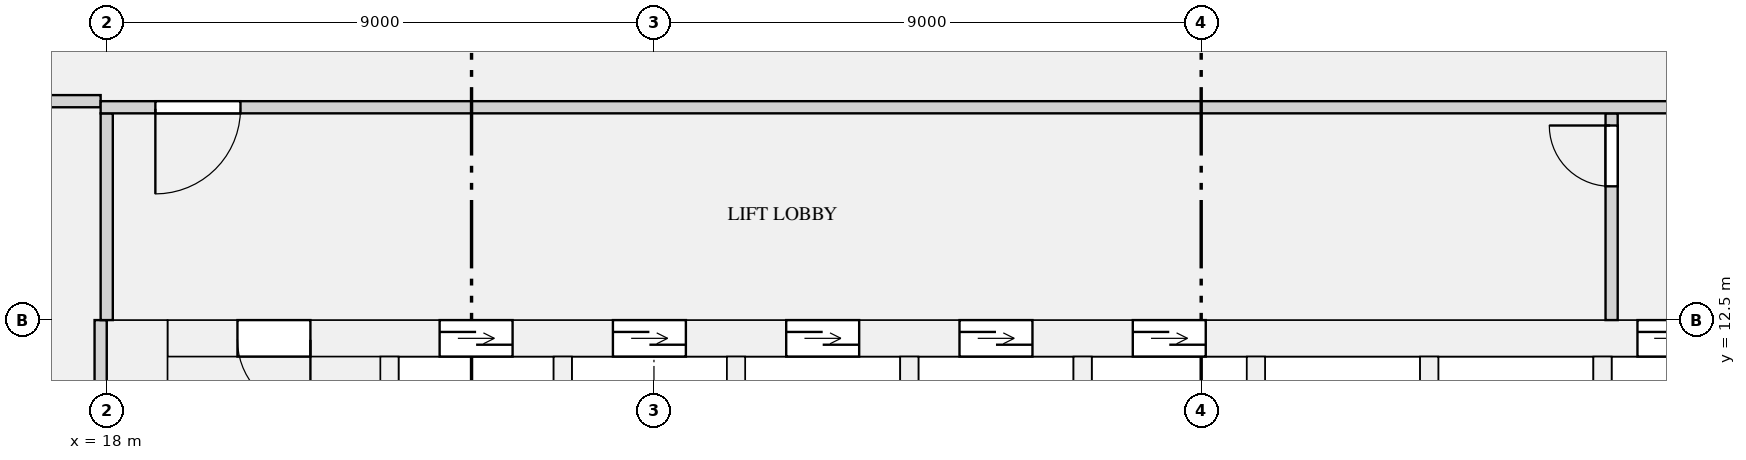
"""IFC4 building model, lengths in metres.
Left out: names, types, materials, properties, quantities, classifications, styles, units other than length and angle.
Written with IfcOpenShell. Run it as: python <this file> out.ifc"""

import sys

from ifc_helpers import new_model, si_unit, direction, frame, frame_2d, origin, place, context, subcontext, project, spatial, rectangle, extrude, element, fill, save


model = new_model("IFC4")
c1 = context("Model", 3, precision=1e-05, world=origin(), true_north=direction((0.0, 1.0)))
c2 = subcontext(c1, "Body", "Model", "MODEL_VIEW")
j1 = project(units=[si_unit("LENGTHUNIT", "METRE"), si_unit("PLANEANGLEUNIT", "RADIAN")], contexts=[c1])
p1 = place(None, origin())
s1 = spatial("IfcSite", under=j1, at=p1, CompositionType="ELEMENT")
p2 = place(p1, origin())
s2 = spatial("IfcBuilding", under=s1, at=p2, CompositionType="ELEMENT")
p3 = place(p2, frame((0.0, 0.0, 15.5)))
s3 = spatial("IfcBuildingStorey", under=s2, at=p3, CompositionType="ELEMENT", Elevation=15.5)
p4 = place(p3, frame((18.5, 0.0, 0.0), z_axis=(0.0, 0.0, 1.0), x_axis=(0.0, 1.0, 0.0)))
e1 = element("IfcWall", 1, at=p4, inside=s3, PredefinedType="SHEAR", context=c2, shape_type="SweptSolid", body=[
    extrude(rectangle(XDim=12.5, YDim=1.0, at=frame_2d((6.25, 0.0))), origin(), (0.0, 0.0, 1.0), 4.0),
])
p5 = place(p3, frame((19.0, 12.2, 0.0), z_axis=(0.0, 0.0, 1.0), x_axis=(1.0, 0.0, 0.0)))
e2 = element("IfcWall", 2, at=p5, inside=s3, PredefinedType="SHEAR", context=c2, shape_type="SweptSolid", body=[
    extrude(rectangle(XDim=34.0, YDim=0.6, at=frame_2d((17.0, 0.0))), origin(), (0.0, 0.0, 1.0), 4.0),
])
p6 = place(p5, frame((4.475, 0.0, 0.0)))
e3 = element("IfcOpeningElement", 3, at=p6, cuts=e2, PredefinedType="OPENING", context=c2, shape_type="SweptSolid", body=[
    extrude(rectangle(XDim=1.2, YDim=2.1, at=frame_2d((0.6, 1.05))), frame((0.0, 0.31, 0.0), z_axis=(0.0, -1.0, 0.0), x_axis=(1.0, 0.0, 0.0)), (0.0, 0.0, 1.0), 0.62),
])
p7 = place(p5, frame((7.325, 0.0, 0.0)))
e4 = element("IfcOpeningElement", 4, at=p7, cuts=e2, PredefinedType="OPENING", context=c2, shape_type="SweptSolid", body=[
    extrude(rectangle(XDim=1.2, YDim=2.1, at=frame_2d((0.6, 1.05))), frame((0.0, 0.31, 0.0), z_axis=(0.0, -1.0, 0.0), x_axis=(1.0, 0.0, 0.0)), (0.0, 0.0, 1.0), 0.62),
])
p8 = place(p5, frame((10.175, 0.0, 0.0)))
e5 = element("IfcOpeningElement", 5, at=p8, cuts=e2, PredefinedType="OPENING", context=c2, shape_type="SweptSolid", body=[
    extrude(rectangle(XDim=1.2, YDim=2.1, at=frame_2d((0.6, 1.05))), frame((0.0, 0.31, 0.0), z_axis=(0.0, -1.0, 0.0), x_axis=(1.0, 0.0, 0.0)), (0.0, 0.0, 1.0), 0.62),
])
p9 = place(p5, frame((13.025, 0.0, 0.0)))
e6 = element("IfcOpeningElement", 6, at=p9, cuts=e2, PredefinedType="OPENING", context=c2, shape_type="SweptSolid", body=[
    extrude(rectangle(XDim=1.2, YDim=2.1, at=frame_2d((0.6, 1.05))), frame((0.0, 0.31, 0.0), z_axis=(0.0, -1.0, 0.0), x_axis=(1.0, 0.0, 0.0)), (0.0, 0.0, 1.0), 0.62),
])
p10 = place(p5, frame((15.875, 0.0, 0.0)))
e7 = element("IfcOpeningElement", 7, at=p10, cuts=e2, PredefinedType="OPENING", context=c2, shape_type="SweptSolid", body=[
    extrude(rectangle(XDim=1.2, YDim=2.1, at=frame_2d((0.6, 1.05))), frame((0.0, 0.31, 0.0), z_axis=(0.0, -1.0, 0.0), x_axis=(1.0, 0.0, 0.0)), (0.0, 0.0, 1.0), 0.62),
])
p11 = place(p5, frame((24.175, 0.0, 0.0)))
e8 = element("IfcOpeningElement", 8, at=p11, cuts=e2, PredefinedType="OPENING", context=c2, shape_type="SweptSolid", body=[
    extrude(rectangle(XDim=1.1, YDim=2.1, at=frame_2d((0.55, 1.05))), frame((0.0, 0.31, 0.0), z_axis=(0.0, -1.0, 0.0), x_axis=(1.0, 0.0, 0.0)), (0.0, 0.0, 1.0), 0.62),
])
p12 = place(p5, frame((26.425, 0.0, 0.0)))
e9 = element("IfcOpeningElement", 9, at=p12, cuts=e2, PredefinedType="OPENING", context=c2, shape_type="SweptSolid", body=[
    extrude(rectangle(XDim=1.1, YDim=2.1, at=frame_2d((0.55, 1.05))), frame((0.0, 0.31, 0.0), z_axis=(0.0, -1.0, 0.0), x_axis=(1.0, 0.0, 0.0)), (0.0, 0.0, 1.0), 0.62),
])
p13 = place(p5, frame((28.675, 0.0, 0.0)))
e10 = element("IfcOpeningElement", 10, at=p13, cuts=e2, PredefinedType="OPENING", context=c2, shape_type="SweptSolid", body=[
    extrude(rectangle(XDim=1.1, YDim=2.1, at=frame_2d((0.55, 1.05))), frame((0.0, 0.31, 0.0), z_axis=(0.0, -1.0, 0.0), x_axis=(1.0, 0.0, 0.0)), (0.0, 0.0, 1.0), 0.62),
])
p14 = place(p5, frame((1.15, 0.0, 0.0)))
e11 = element("IfcOpeningElement", 11, at=p14, cuts=e2, PredefinedType="OPENING", context=c2, shape_type="SweptSolid", body=[
    extrude(rectangle(XDim=1.2, YDim=2.1, at=frame_2d((0.6, 1.05))), frame((0.0, 0.31, 0.0), z_axis=(0.0, -1.0, 0.0), x_axis=(1.0, 0.0, 0.0)), (0.0, 0.0, 1.0), 0.62),
])
p15 = place(p5, frame((31.65, 0.0, 0.0)))
e12 = element("IfcOpeningElement", 12, at=p15, cuts=e2, PredefinedType="OPENING", context=c2, shape_type="SweptSolid", body=[
    extrude(rectangle(XDim=1.2, YDim=2.1, at=frame_2d((0.6, 1.05))), frame((0.0, 0.31, 0.0), z_axis=(0.0, -1.0, 0.0), x_axis=(1.0, 0.0, 0.0)), (0.0, 0.0, 1.0), 0.62),
])
for number, where, z_axis, x_axis in (
    (13, (22.65, 9.35, 0.0), (0.0, 0.0, 1.0), (0.0, 1.0, 0.0)),
    (14, (25.5, 9.35, 0.0), (0.0, 0.0, 1.0), (0.0, 1.0, 0.0)),
    (15, (28.35, 9.35, 0.0), (0.0, 0.0, 1.0), (0.0, 1.0, 0.0)),
    (16, (31.2, 9.35, 0.0), (0.0, 0.0, 1.0), (0.0, 1.0, 0.0)),
    (17, (34.05, 9.35, 0.0), (0.0, 0.0, 1.0), (0.0, 1.0, 0.0)),
    (18, (36.9, 9.35, 0.0), (0.0, 0.0, 1.0), (0.0, 1.0, 0.0)),
    (19, (39.75, 9.35, 0.0), (0.0, 0.0, 1.0), (0.0, 1.0, 0.0)),
):
    element("IfcWall", number, at=place(p3, frame(where, z_axis=z_axis, x_axis=x_axis)), inside=s3, PredefinedType="SHEAR", context=c2, shape_type="SweptSolid", body=[
        extrude(rectangle(XDim=2.55, YDim=0.3, at=frame_2d((1.275, 0.0))), origin(), (0.0, 0.0, 1.0), 4.0),
    ])
p16 = place(p3, frame((42.6, 8.25, 0.0), z_axis=(0.0, 0.0, 1.0), x_axis=(0.0, 1.0, 0.0)))
e20 = element("IfcWall", 20, at=p16, inside=s3, PredefinedType="SHEAR", context=c2, shape_type="SweptSolid", body=[
    extrude(rectangle(XDim=3.65, YDim=0.3, at=frame_2d((1.825, 0.0))), origin(), (0.0, 0.0, 1.0), 4.0),
])
p17 = place(p3, frame((18.0, 12.5, 0.0), z_axis=(0.0, 0.0, 1.0), x_axis=(0.0, 1.0, 0.0)))
e21 = element("IfcWall", 21, at=p17, inside=s3, PredefinedType="PARTITIONING", context=c2, shape_type="SweptSolid", body=[
    extrude(rectangle(XDim=3.4, YDim=0.2, at=frame_2d((1.7, 0.0))), origin(), (0.0, 0.0, 1.0), 3.68),
])
p18 = place(p3, frame((42.75, 12.5, 0.0), z_axis=(0.0, 0.0, 1.0), x_axis=(0.0, 1.0, 0.0)))
e22 = element("IfcWall", 22, at=p18, inside=s3, PredefinedType="PARTITIONING", context=c2, shape_type="SweptSolid", body=[
    extrude(rectangle(XDim=3.4, YDim=0.2, at=frame_2d((1.7, 0.0))), origin(), (0.0, 0.0, 1.0), 3.68),
])
p19 = place(p18, frame((2.2, 0.0, 0.0)))
e23 = element("IfcOpeningElement", 23, at=p19, cuts=e22, PredefinedType="OPENING", context=c2, shape_type="SweptSolid", body=[
    extrude(rectangle(XDim=1.0, YDim=2.1, at=frame_2d((0.5, 1.05))), frame((0.0, 0.11, 0.0), z_axis=(0.0, -1.0, 0.0), x_axis=(1.0, 0.0, 0.0)), (0.0, 0.0, 1.0), 0.22),
])
p20 = place(p3, frame((17.9, 16.0, 0.0), z_axis=(0.0, 0.0, 1.0), x_axis=(1.0, 0.0, 0.0)))
e24 = element("IfcWall", 24, at=p20, inside=s3, PredefinedType="PARTITIONING", context=c2, shape_type="SweptSolid", body=[
    extrude(rectangle(XDim=36.2, YDim=0.2, at=frame_2d((18.1, 0.0))), origin(), (0.0, 0.0, 1.0), 3.68),
])
p21 = place(p20, frame((0.9, 0.0, 0.0)))
e25 = element("IfcOpeningElement", 25, at=p21, cuts=e24, PredefinedType="OPENING", context=c2, shape_type="SweptSolid", body=[
    extrude(rectangle(XDim=1.4, YDim=2.1, at=frame_2d((0.7, 1.05))), frame((0.0, 0.11, 0.0), z_axis=(0.0, -1.0, 0.0), x_axis=(1.0, 0.0, 0.0)), (0.0, 0.0, 1.0), 0.22),
])
p22 = place(p20, frame((33.9, 0.0, 0.0)))
e26 = element("IfcOpeningElement", 26, at=p22, cuts=e24, PredefinedType="OPENING", context=c2, shape_type="SweptSolid", body=[
    extrude(rectangle(XDim=1.4, YDim=2.1, at=frame_2d((0.7, 1.05))), frame((0.0, 0.11, 0.0), z_axis=(0.0, -1.0, 0.0), x_axis=(1.0, 0.0, 0.0)), (0.0, 0.0, 1.0), 0.22),
])
p23 = place(p3, frame((4.3, 16.1, 0.0), z_axis=(0.0, 0.0, 1.0), x_axis=(1.0, 0.0, 0.0)))
e27 = element("IfcWall", 27, at=p23, inside=s3, PredefinedType="PARTITIONING", context=c2, shape_type="SweptSolid", body=[
    extrude(rectangle(XDim=13.6, YDim=0.2, at=frame_2d((6.8, 0.0))), origin(), (0.0, 0.0, 1.0), 3.68),
])
p24 = place(p23, frame((0.45, 0.0, 0.0)))
e28 = element("IfcOpeningElement", 28, at=p24, cuts=e27, PredefinedType="OPENING", context=c2, shape_type="SweptSolid", body=[
    extrude(rectangle(XDim=1.8, YDim=2.1, at=frame_2d((0.9, 1.05))), frame((0.0, 0.11, 0.0), z_axis=(0.0, -1.0, 0.0), x_axis=(1.0, 0.0, 0.0)), (0.0, 0.0, 1.0), 0.22),
])
p25 = place(p23, frame((5.3, 0.0, 0.0)))
e29 = element("IfcOpeningElement", 29, at=p25, cuts=e27, PredefinedType="OPENING", context=c2, shape_type="SweptSolid", body=[
    extrude(rectangle(XDim=1.8, YDim=2.1, at=frame_2d((0.9, 1.05))), frame((0.0, 0.11, 0.0), z_axis=(0.0, -1.0, 0.0), x_axis=(1.0, 0.0, 0.0)), (0.0, 0.0, 1.0), 0.22),
])
p26 = place(p23, frame((10.25, 0.0, 0.0)))
e30 = element("IfcOpeningElement", 30, at=p26, cuts=e27, PredefinedType="OPENING", context=c2, shape_type="SweptSolid", body=[
    extrude(rectangle(XDim=1.8, YDim=2.1, at=frame_2d((0.9, 1.05))), frame((0.0, 0.11, 0.0), z_axis=(0.0, -1.0, 0.0), x_axis=(1.0, 0.0, 0.0)), (0.0, 0.0, 1.0), 0.22),
])
p27 = place(p3, frame((17.9, 1.55, 0.0), z_axis=(0.0, 0.0, 1.0), x_axis=(0.0, 1.0, 0.0)))
e31 = element("IfcWall", 31, at=p27, inside=s3, PredefinedType="PARTITIONING", context=c2, shape_type="SweptSolid", body=[
    extrude(rectangle(XDim=10.95, YDim=0.2, at=frame_2d((5.475, 0.0))), origin(), (0.0, 0.0, 1.0), 3.68),
])
p28 = place(p6, origin())
e32 = element("IfcDoor", 32, at=p28, inside=s3, OperationType="DOUBLE_DOOR_SLIDING", PredefinedType="DOOR", context=c2, shape_type="SweptSolid", body=[
    extrude(rectangle(XDim=1.2, YDim=2.1, at=frame_2d((0.6, 1.05))), frame((0.0, 0.025, 0.0), z_axis=(0.0, -1.0, 0.0), x_axis=(1.0, 0.0, 0.0)), (0.0, 0.0, 1.0), 0.05),
])
fill(e3, e32)
p29 = place(p7, origin())
e33 = element("IfcDoor", 33, at=p29, inside=s3, OperationType="DOUBLE_DOOR_SLIDING", PredefinedType="DOOR", context=c2, shape_type="SweptSolid", body=[
    extrude(rectangle(XDim=1.2, YDim=2.1, at=frame_2d((0.6, 1.05))), frame((0.0, 0.025, 0.0), z_axis=(0.0, -1.0, 0.0), x_axis=(1.0, 0.0, 0.0)), (0.0, 0.0, 1.0), 0.05),
])
fill(e4, e33)
p30 = place(p8, origin())
e34 = element("IfcDoor", 34, at=p30, inside=s3, OperationType="DOUBLE_DOOR_SLIDING", PredefinedType="DOOR", context=c2, shape_type="SweptSolid", body=[
    extrude(rectangle(XDim=1.2, YDim=2.1, at=frame_2d((0.6, 1.05))), frame((0.0, 0.025, 0.0), z_axis=(0.0, -1.0, 0.0), x_axis=(1.0, 0.0, 0.0)), (0.0, 0.0, 1.0), 0.05),
])
fill(e5, e34)
p31 = place(p9, origin())
e35 = element("IfcDoor", 35, at=p31, inside=s3, OperationType="DOUBLE_DOOR_SLIDING", PredefinedType="DOOR", context=c2, shape_type="SweptSolid", body=[
    extrude(rectangle(XDim=1.2, YDim=2.1, at=frame_2d((0.6, 1.05))), frame((0.0, 0.025, 0.0), z_axis=(0.0, -1.0, 0.0), x_axis=(1.0, 0.0, 0.0)), (0.0, 0.0, 1.0), 0.05),
])
fill(e6, e35)
p32 = place(p10, origin())
e36 = element("IfcDoor", 36, at=p32, inside=s3, OperationType="DOUBLE_DOOR_SLIDING", PredefinedType="DOOR", context=c2, shape_type="SweptSolid", body=[
    extrude(rectangle(XDim=1.2, YDim=2.1, at=frame_2d((0.6, 1.05))), frame((0.0, 0.025, 0.0), z_axis=(0.0, -1.0, 0.0), x_axis=(1.0, 0.0, 0.0)), (0.0, 0.0, 1.0), 0.05),
])
fill(e7, e36)
p33 = place(p11, origin())
e37 = element("IfcDoor", 37, at=p33, inside=s3, OperationType="DOUBLE_DOOR_SLIDING", PredefinedType="DOOR", context=c2, shape_type="SweptSolid", body=[
    extrude(rectangle(XDim=1.1, YDim=2.1, at=frame_2d((0.55, 1.05))), frame((0.0, 0.025, 0.0), z_axis=(0.0, -1.0, 0.0), x_axis=(1.0, 0.0, 0.0)), (0.0, 0.0, 1.0), 0.05),
])
fill(e8, e37)
p34 = place(p14, frame((1.2, 0.0, 0.0), z_axis=(0.0, 0.0, 1.0), x_axis=(-1.0, 0.0, 0.0)))
e38 = element("IfcDoor", 38, at=p34, inside=s3, OperationType="SINGLE_SWING_LEFT", PredefinedType="DOOR", context=c2, shape_type="SweptSolid", body=[
    extrude(rectangle(XDim=1.2, YDim=2.1, at=frame_2d((0.6, 1.05))), frame((0.0, 0.025, 0.0), z_axis=(0.0, -1.0, 0.0), x_axis=(1.0, 0.0, 0.0)), (0.0, 0.0, 1.0), 0.05),
])
fill(e11, e38)
p35 = place(p19, origin())
e39 = element("IfcDoor", 39, at=p35, inside=s3, OperationType="SINGLE_SWING_RIGHT", PredefinedType="DOOR", context=c2, shape_type="SweptSolid", body=[
    extrude(rectangle(XDim=1.0, YDim=2.1, at=frame_2d((0.5, 1.05))), frame((0.0, 0.025, 0.0), z_axis=(0.0, -1.0, 0.0), x_axis=(1.0, 0.0, 0.0)), (0.0, 0.0, 1.0), 0.05),
])
fill(e23, e39)
p36 = place(p21, frame((1.4, 0.0, 0.0), z_axis=(0.0, 0.0, 1.0), x_axis=(-1.0, 0.0, 0.0)))
e40 = element("IfcDoor", 40, at=p36, inside=s3, OperationType="SINGLE_SWING_RIGHT", PredefinedType="DOOR", context=c2, shape_type="SweptSolid", body=[
    extrude(rectangle(XDim=1.4, YDim=2.1, at=frame_2d((0.7, 1.05))), frame((0.0, 0.025, 0.0), z_axis=(0.0, -1.0, 0.0), x_axis=(1.0, 0.0, 0.0)), (0.0, 0.0, 1.0), 0.05),
])
fill(e25, e40)
save(model, sys.argv[1])
